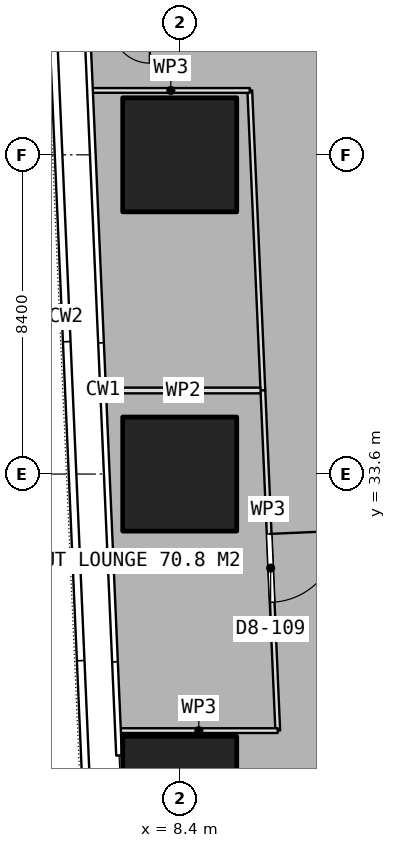
"""IFC4 building model, lengths in metres.
Left out: names, types, materials, properties, quantities, classifications, styles, units other than length and angle.
Written with IfcOpenShell. Run it as: python <this file> out.ifc"""

import sys

from ifc_helpers import new_model, si_unit, direction, frame, frame_2d, origin, origin_2d, place, context, subcontext, project, spatial, rectangle, extrude, element, fill, save


model = new_model("IFC4")
c1 = context("Model", 3, precision=1e-05, world=origin(), true_north=direction((0.0, 1.0)))
c2 = subcontext(c1, "Body", "Model", "MODEL_VIEW")
j1 = project(units=[si_unit("LENGTHUNIT", "METRE"), si_unit("PLANEANGLEUNIT", "RADIAN")], contexts=[c1])
p1 = place(None, origin())
s1 = spatial("IfcSite", under=j1, at=p1, CompositionType="ELEMENT")
p2 = place(p1, origin())
s2 = spatial("IfcBuilding", under=s1, at=p2, CompositionType="ELEMENT")
p3 = place(p2, frame((0.0, 0.0, 81.65)))
s3 = spatial("IfcBuildingStorey", under=s2, at=p3, CompositionType="ELEMENT", Elevation=81.65)
for number, where, z_axis, x_axis in (
    (1, (8.4, 25.2, 0.0), (0.0, 0.0, 1.0), (1.0, 0.0, 0.0)),
    (2, (8.4, 33.6, 0.0), (0.0, 0.0, 1.0), (1.0, 0.0, 0.0)),
    (3, (8.4, 42.0, 0.0), (0.0, 0.0, 1.0), (1.0, 0.0, 0.0)),
):
    element("IfcColumn", number, at=place(p3, frame(where, z_axis=z_axis, x_axis=x_axis)), inside=s3, PredefinedType="COLUMN", context=c2, shape_type="SweptSolid", body=[
        extrude(rectangle(XDim=3.0, YDim=3.0, at=origin_2d()), origin(), (0.0, 0.0, 1.0), 3.75),
    ])
p4 = place(p3, frame((10.244, 43.694, 0.0), z_axis=(0.0, 0.0, 1.0), x_axis=(0.043694696319, -0.999044930678, 0.0)))
e4 = element("IfcWall", 4, at=p4, inside=s3, PredefinedType="PARTITIONING", context=c2, shape_type="SweptSolid", body=[
    extrude(rectangle(XDim=7.901, YDim=0.125, at=frame_2d((3.95, 0.0))), origin(), (0.0, 0.0, 1.0), 3.4),
])
p5 = place(p3, frame((10.589, 35.801, 0.0), z_axis=(0.0, 0.0, 1.0), x_axis=(0.04362167733, -0.999048121597, 0.0)))
e5 = element("IfcWall", 5, at=p5, inside=s3, PredefinedType="PARTITIONING", context=c2, shape_type="SweptSolid", body=[
    extrude(rectangle(XDim=8.96, YDim=0.125, at=frame_2d((4.48, 0.0))), origin(), (0.0, 0.0, 1.0), 3.4),
])
p6 = place(p5, frame((3.78, 0.0, 0.0)))
e6 = element("IfcOpeningElement", 6, at=p6, cuts=e5, PredefinedType="OPENING", context=c2, shape_type="SweptSolid", body=[
    extrude(rectangle(XDim=1.8, YDim=2.1, at=frame_2d((0.9, 1.05))), frame((0.0, 0.073, 0.0), z_axis=(0.0, -1.0, 0.0), x_axis=(1.0, 0.0, 0.0)), (0.0, 0.0, 1.0), 0.145),
])
p7 = place(p3, frame((10.98, 26.849, 0.0), z_axis=(0.0, 0.0, 1.0), x_axis=(-1.0, 0.0, 0.0)))
e7 = element("IfcWall", 7, at=p7, inside=s3, PredefinedType="PARTITIONING", context=c2, shape_type="SweptSolid", body=[
    extrude(rectangle(XDim=4.154, YDim=0.125, at=frame_2d((2.077, 0.0))), origin(), (0.0, 0.0, 1.0), 3.4),
])
p8 = place(p3, frame((6.089, 43.694, 0.0), z_axis=(0.0, 0.0, 1.0), x_axis=(1.0, 0.0, 0.0)))
e8 = element("IfcWall", 8, at=p8, inside=s3, PredefinedType="PARTITIONING", context=c2, shape_type="SweptSolid", body=[
    extrude(rectangle(XDim=4.155, YDim=0.125, at=frame_2d((2.077, 0.0))), origin(), (0.0, 0.0, 1.0), 3.4),
])
p9 = place(p3, frame((10.527, 35.799, 0.0), z_axis=(0.0, 0.0, 1.0), x_axis=(-1.0, 0.0, 0.0)))
e9 = element("IfcWall", 9, at=p9, inside=s3, PredefinedType="PARTITIONING", context=c2, shape_type="SweptSolid", body=[
    extrude(rectangle(XDim=4.062, YDim=0.15, at=frame_2d((2.031, 0.0))), origin(), (0.0, 0.0, 1.0), 3.4),
])
p10 = place(p6, origin())
e10 = element("IfcDoor", 10, at=p10, inside=s3, OperationType="DOUBLE_DOOR_SINGLE_SWING", PredefinedType="DOOR", context=c2, shape_type="SweptSolid", body=[
    extrude(rectangle(XDim=1.8, YDim=2.1, at=frame_2d((0.9, 1.05))), frame((0.0, 0.025, 0.0), z_axis=(0.0, -1.0, 0.0), x_axis=(1.0, 0.0, 0.0)), (0.0, 0.0, 1.0), 0.05),
])
fill(e6, e10)
save(model, sys.argv[1])
